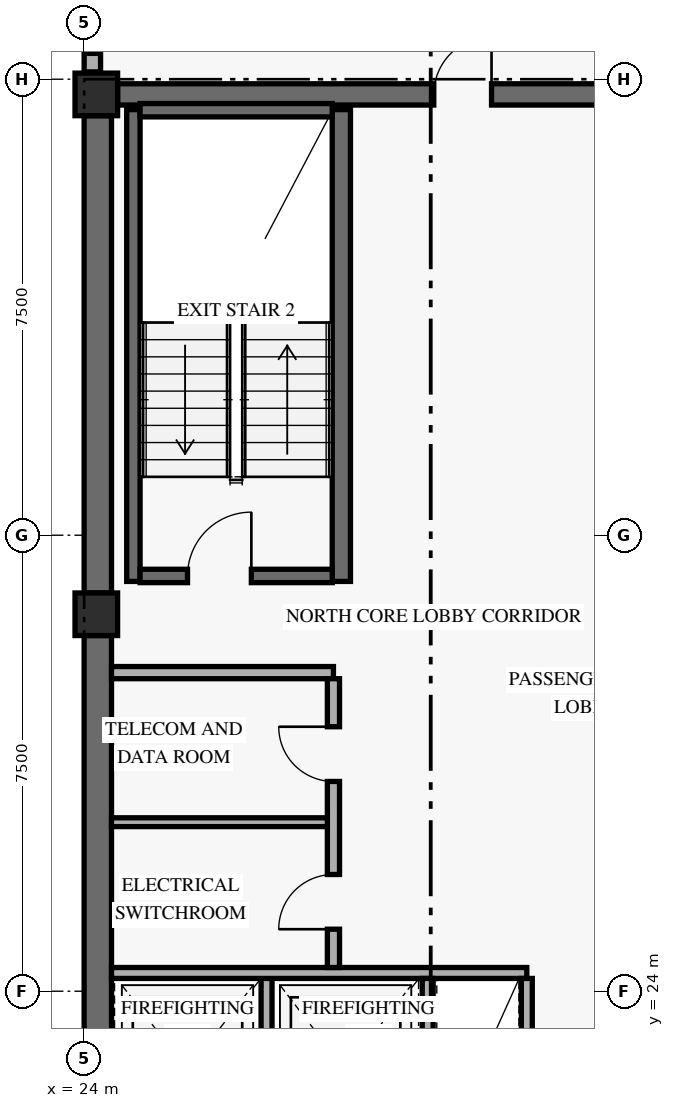
"""IFC4 building model, lengths in metres.
Left out: names, types, materials, properties, quantities, classifications, styles, units other than length and angle.
Written with IfcOpenShell. Run it as: python <this file> out.ifc"""

import sys

from ifc_helpers import new_model, si_unit, direction, frame, frame_2d, origin, origin_2d, place, context, subcontext, project, spatial, rectangle, extrude, element, fill, save


model = new_model("IFC4")
c1 = context("Model", 3, precision=1e-05, world=origin(), true_north=direction((0.0, 1.0)))
c2 = subcontext(c1, "Body", "Model", "MODEL_VIEW")
j1 = project(units=[si_unit("LENGTHUNIT", "METRE"), si_unit("PLANEANGLEUNIT", "RADIAN")], contexts=[c1])
p1 = place(None, origin())
s1 = spatial("IfcSite", under=j1, at=p1, CompositionType="ELEMENT")
p2 = place(p1, origin())
s2 = spatial("IfcBuilding", under=s1, at=p2, CompositionType="ELEMENT")
p3 = place(p2, frame((0.0, 0.0, 264.0)))
s3 = spatial("IfcBuildingStorey", under=s2, at=p3, CompositionType="ELEMENT", Elevation=264.0)
p4 = place(p3, frame((24.225, 17.9, 0.0), z_axis=(0.0, 0.0, 1.0), x_axis=(0.0, 1.0, 0.0)))
e1 = element("IfcWall", 1, at=p4, inside=s3, PredefinedType="SHEAR", context=c2, shape_type="SweptSolid", body=[
    extrude(rectangle(XDim=11.95, YDim=0.45, at=frame_2d((5.975, 0.0))), origin(), (0.0, 0.0, 1.0), 2.821),
])
p5 = place(p3, frame((24.225, 30.55, 0.0), z_axis=(0.0, 0.0, 1.0), x_axis=(0.0, 1.0, 0.0)))
e2 = element("IfcWall", 2, at=p5, inside=s3, PredefinedType="SHEAR", context=c2, shape_type="SweptSolid", body=[
    extrude(rectangle(XDim=7.85, YDim=0.45, at=frame_2d((3.925, 0.0))), origin(), (0.0, 0.0, 1.0), 2.821),
])
p6 = place(p3, frame((24.55, 38.75, 0.0), z_axis=(0.0, 0.0, 1.0), x_axis=(1.0, 0.0, 0.0)))
e3 = element("IfcWall", 3, at=p6, inside=s3, PredefinedType="SHEAR", context=c2, shape_type="SweptSolid", body=[
    extrude(rectangle(XDim=10.3, YDim=0.35, at=frame_2d((5.15, 0.0))), origin(), (0.0, 0.0, 1.0), 3.36),
])
p7 = place(p6, frame((5.2, 0.0, 0.0)))
e4 = element("IfcOpeningElement", 4, at=p7, cuts=e3, PredefinedType="OPENING", context=c2, shape_type="SweptSolid", body=[
    extrude(rectangle(XDim=0.95, YDim=2.15, at=frame_2d((0.475, 1.075))), frame((0.0, 0.185, 0.0), z_axis=(0.0, -1.0, 0.0), x_axis=(1.0, 0.0, 0.0)), (0.0, 0.0, 1.0), 0.37),
])
p8 = place(p3, frame((24.81, 30.74, 0.0), z_axis=(0.0, 0.0, 1.0), x_axis=(0.0, 1.0, 0.0)))
e5 = element("IfcWall", 5, at=p8, inside=s3, PredefinedType="SHEAR", context=c2, shape_type="SweptSolid", body=[
    extrude(rectangle(XDim=7.76, YDim=0.22, at=frame_2d((3.88, 0.0))), origin(), (0.0, 0.0, 1.0), 3.36),
])
p9 = place(p3, frame((28.23, 30.74, 0.0), z_axis=(0.0, 0.0, 1.0), x_axis=(0.0, 1.0, 0.0)))
e6 = element("IfcWall", 6, at=p9, inside=s3, PredefinedType="SHEAR", context=c2, shape_type="SweptSolid", body=[
    extrude(rectangle(XDim=7.76, YDim=0.3, at=frame_2d((3.88, 0.0))), origin(), (0.0, 0.0, 1.0), 3.36),
])
p10 = place(p3, frame((24.92, 30.83, 0.0), z_axis=(0.0, 0.0, 1.0), x_axis=(1.0, 0.0, 0.0)))
e7 = element("IfcWall", 7, at=p10, inside=s3, PredefinedType="SHEAR", context=c2, shape_type="SweptSolid", body=[
    extrude(rectangle(XDim=3.16, YDim=0.22, at=frame_2d((1.58, 0.0))), origin(), (0.0, 0.0, 1.0), 3.36),
])
p11 = place(p10, frame((0.78, 0.0, 0.0)))
e8 = element("IfcOpeningElement", 8, at=p11, cuts=e7, PredefinedType="OPENING", context=c2, shape_type="SweptSolid", body=[
    extrude(rectangle(XDim=1.05, YDim=2.15, at=frame_2d((0.525, 1.075))), frame((0.0, 0.12, 0.0), z_axis=(0.0, -1.0, 0.0), x_axis=(1.0, 0.0, 0.0)), (0.0, 0.0, 1.0), 0.24),
])
p12 = place(p3, frame((24.92, 38.49, 0.0), z_axis=(0.0, 0.0, 1.0), x_axis=(1.0, 0.0, 0.0)))
e9 = element("IfcWall", 9, at=p12, inside=s3, PredefinedType="SHEAR", context=c2, shape_type="SweptSolid", body=[
    extrude(rectangle(XDim=3.16, YDim=0.22, at=frame_2d((1.58, 0.0))), origin(), (0.0, 0.0, 1.0), 3.36),
])
for number, where, z_axis, x_axis in (
    (10, (24.2, 30.2, 0.0), (0.0, 0.0, 1.0), (1.0, 0.0, 0.0)),
    (11, (24.2, 38.75, 0.0), (0.0, 0.0, 1.0), (1.0, 0.0, 0.0)),
):
    element("IfcColumn", number, at=place(p3, frame(where, z_axis=z_axis, x_axis=x_axis)), inside=s3, PredefinedType="COLUMN", context=c2, shape_type="SweptSolid", body=[
        extrude(rectangle(XDim=0.7, YDim=0.7, at=origin_2d()), origin(), (0.0, 0.0, 1.0), 3.6),
    ])
p13 = place(p3, frame((24.135, 39.12, 0.0), z_axis=(0.0, 0.0, 1.0), x_axis=(0.0, 1.0, 0.0)))
e12 = element("IfcWall", 12, at=p13, inside=s3, PredefinedType="SOLIDWALL", context=c2, shape_type="SweptSolid", body=[
    extrude(rectangle(XDim=1.56, YDim=0.27, at=frame_2d((0.78, 0.0))), origin(), (0.0, 0.0, 1.0), 2.803),
])
p14 = place(p13, frame((0.305, 0.0, 0.85)))
e13 = element("IfcOpeningElement", 13, at=p14, cuts=e12, PredefinedType="OPENING", context=c2, shape_type="SweptSolid", body=[
    extrude(rectangle(XDim=0.95, YDim=1.5, at=frame_2d((0.475, 0.75))), frame((0.0, 0.145, 0.0), z_axis=(0.0, -1.0, 0.0), x_axis=(1.0, 0.0, 0.0)), (0.0, 0.0, 1.0), 0.29),
])
p15 = place(p3, frame((27.0, 21.19, 0.0), z_axis=(0.0, 0.0, 1.0), x_axis=(0.0, 1.0, 0.0)))
e14 = element("IfcWall", 14, at=p15, inside=s3, PredefinedType="STANDARD", context=c2, shape_type="SweptSolid", body=[
    extrude(rectangle(XDim=3.11, YDim=0.18, at=frame_2d((1.555, 0.0))), origin(), (0.0, 0.0, 1.0), 3.36),
])
p16 = place(p3, frame((24.45, 24.3, 0.0), z_axis=(0.0, 0.0, 1.0), x_axis=(1.0, 0.0, 0.0)))
e15 = element("IfcWall", 15, at=p16, inside=s3, PredefinedType="STANDARD", context=c2, shape_type="SweptSolid", body=[
    extrude(rectangle(XDim=6.83, YDim=0.18, at=frame_2d((3.415, 0.0))), origin(), (0.0, 0.0, 1.0), 3.36),
])
for number, where, z_axis, x_axis in (
    (16, (29.65, 21.19, 0.0), (0.0, 0.0, 1.0), (0.0, 1.0, 0.0)),
    (17, (31.28, 21.19, 0.0), (0.0, 0.0, 1.0), (0.0, 1.0, 0.0)),
):
    element("IfcWall", number, at=place(p3, frame(where, z_axis=z_axis, x_axis=x_axis)), inside=s3, PredefinedType="STANDARD", context=c2, shape_type="SweptSolid", body=[
        extrude(rectangle(XDim=3.02, YDim=0.18, at=frame_2d((1.51, 0.0))), origin(), (0.0, 0.0, 1.0), 3.36),
    ])
p17 = place(p3, frame((24.45, 29.24, 0.0), z_axis=(0.0, 0.0, 1.0), x_axis=(1.0, 0.0, 0.0)))
e18 = element("IfcWall", 18, at=p17, inside=s3, PredefinedType="STANDARD", context=c2, shape_type="SweptSolid", body=[
    extrude(rectangle(XDim=3.65, YDim=0.2, at=frame_2d((1.825, 0.0))), origin(), (0.0, 0.0, 1.0), 3.36),
])
p18 = place(p3, frame((28.1, 24.39, 0.0), z_axis=(0.0, 0.0, 1.0), x_axis=(0.0, 1.0, 0.0)))
e19 = element("IfcWall", 19, at=p18, inside=s3, PredefinedType="STANDARD", context=c2, shape_type="SweptSolid", body=[
    extrude(rectangle(XDim=4.75, YDim=0.2, at=frame_2d((2.375, 0.0))), origin(), (0.0, 0.0, 1.0), 3.36),
])
p19 = place(p18, frame((0.63, 0.0, 0.0)))
e20 = element("IfcOpeningElement", 20, at=p19, cuts=e19, PredefinedType="OPENING", context=c2, shape_type="SweptSolid", body=[
    extrude(rectangle(XDim=0.9, YDim=2.1, at=frame_2d((0.45, 1.05))), frame((0.0, 0.11, 0.0), z_axis=(0.0, -1.0, 0.0), x_axis=(1.0, 0.0, 0.0)), (0.0, 0.0, 1.0), 0.22),
])
p20 = place(p18, frame((3.06, 0.0, 0.0)))
e21 = element("IfcOpeningElement", 21, at=p20, cuts=e19, PredefinedType="OPENING", context=c2, shape_type="SweptSolid", body=[
    extrude(rectangle(XDim=0.9, YDim=2.1, at=frame_2d((0.45, 1.05))), frame((0.0, 0.11, 0.0), z_axis=(0.0, -1.0, 0.0), x_axis=(1.0, 0.0, 0.0)), (0.0, 0.0, 1.0), 0.22),
])
p21 = place(p3, frame((24.45, 26.78, 0.0), z_axis=(0.0, 0.0, 1.0), x_axis=(1.0, 0.0, 0.0)))
e22 = element("IfcWall", 22, at=p21, inside=s3, PredefinedType="PARTITIONING", context=c2, shape_type="SweptSolid", body=[
    extrude(rectangle(XDim=3.55, YDim=0.145, at=frame_2d((1.775, 0.0))), origin(), (0.0, 0.0, 1.0), 3.36),
])
p22 = place(p14, origin())
e23 = element("IfcWindow", 23, at=p22, inside=s3, PartitioningType="SINGLE_PANEL", PredefinedType="WINDOW", context=c2, shape_type="SweptSolid", body=[
    extrude(rectangle(XDim=0.95, YDim=1.5, at=frame_2d((0.475, 0.75))), frame((0.0, 0.03, 0.0), z_axis=(0.0, -1.0, 0.0), x_axis=(1.0, 0.0, 0.0)), (0.0, 0.0, 1.0), 0.06),
])
fill(e13, e23)
p23 = place(p11, origin())
e24 = element("IfcDoor", 24, at=p23, inside=s3, OperationType="SINGLE_SWING_RIGHT", PredefinedType="DOOR", context=c2, shape_type="SweptSolid", body=[
    extrude(rectangle(XDim=1.05, YDim=2.15, at=frame_2d((0.525, 1.075))), frame((0.0, 0.025, 0.0), z_axis=(0.0, -1.0, 0.0), x_axis=(1.0, 0.0, 0.0)), (0.0, 0.0, 1.0), 0.05),
])
fill(e8, e24)
p24 = place(p19, origin())
e25 = element("IfcDoor", 25, at=p24, inside=s3, OperationType="SINGLE_SWING_LEFT", PredefinedType="DOOR", context=c2, shape_type="SweptSolid", body=[
    extrude(rectangle(XDim=0.9, YDim=2.1, at=frame_2d((0.45, 1.05))), frame((0.0, 0.025, 0.0), z_axis=(0.0, -1.0, 0.0), x_axis=(1.0, 0.0, 0.0)), (0.0, 0.0, 1.0), 0.05),
])
fill(e20, e25)
p25 = place(p20, origin())
e26 = element("IfcDoor", 26, at=p25, inside=s3, OperationType="SINGLE_SWING_RIGHT", PredefinedType="DOOR", context=c2, shape_type="SweptSolid", body=[
    extrude(rectangle(XDim=0.9, YDim=2.1, at=frame_2d((0.45, 1.05))), frame((0.0, 0.025, 0.0), z_axis=(0.0, -1.0, 0.0), x_axis=(1.0, 0.0, 0.0)), (0.0, 0.0, 1.0), 0.05),
])
fill(e21, e26)
p26 = place(p7, origin())
e27 = element("IfcDoor", 27, at=p26, inside=s3, OperationType="SINGLE_SWING_RIGHT", PredefinedType="DOOR", context=c2, shape_type="SweptSolid", body=[
    extrude(rectangle(XDim=0.95, YDim=2.15, at=frame_2d((0.475, 1.075))), frame((0.0, 0.025, 0.0), z_axis=(0.0, -1.0, 0.0), x_axis=(1.0, 0.0, 0.0)), (0.0, 0.0, 1.0), 0.05),
])
fill(e4, e27)
save(model, sys.argv[1])
